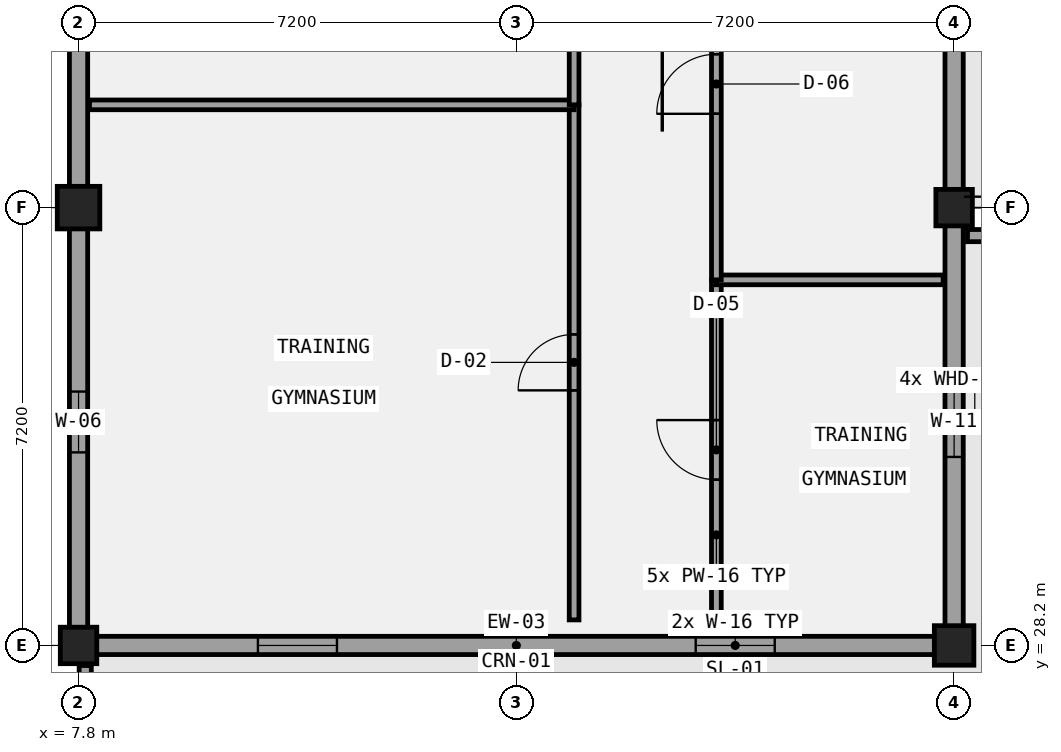
"""IFC4 building model, lengths in metres.
Left out: names, types, materials, properties, quantities, classifications, styles, units other than length and angle.
Written with IfcOpenShell. Run it as: python <this file> out.ifc"""

import sys

from ifc_helpers import new_model, si_unit, direction, frame, frame_2d, origin, origin_2d, place, context, subcontext, project, spatial, rectangle, extrude, element, fill, save


model = new_model("IFC4")
c1 = context("Model", 3, precision=1e-05, world=origin(), true_north=direction((0.0, 1.0)))
c2 = subcontext(c1, "Body", "Model", "MODEL_VIEW")
j1 = project(units=[si_unit("LENGTHUNIT", "METRE"), si_unit("PLANEANGLEUNIT", "RADIAN")], contexts=[c1])
p1 = place(None, origin())
s1 = spatial("IfcSite", under=j1, at=p1, CompositionType="ELEMENT")
p2 = place(p1, origin())
s2 = spatial("IfcBuilding", under=s1, at=p2, CompositionType="ELEMENT")
p3 = place(p2, frame((0.0, 0.0, 13.8)))
s3 = spatial("IfcBuildingStorey", under=s2, at=p3, CompositionType="ELEMENT", Elevation=13.8)
p4 = place(p3, frame((7.8, 28.2, 0.0), z_axis=(0.0, 0.0, 1.0), x_axis=(1.0, 0.0, 0.0)))
e1 = element("IfcColumn", 1, at=p4, inside=s3, PredefinedType="COLUMN", context=c2, shape_type="SweptSolid", body=[
    extrude(rectangle(XDim=0.6, YDim=0.6, at=origin_2d()), origin(), (0.0, 0.0, 1.0), 4.2),
])
p5 = place(p3, frame((7.8, 35.4, 0.0), z_axis=(0.0, 0.0, 1.0), x_axis=(1.0, 0.0, 0.0)))
e2 = element("IfcColumn", 2, at=p5, inside=s3, PredefinedType="COLUMN", context=c2, shape_type="SweptSolid", body=[
    extrude(rectangle(XDim=0.7, YDim=0.7, at=origin_2d()), origin(), (0.0, 0.0, 1.0), 4.2),
])
p6 = place(p3, frame((22.2, 28.2, 0.0), z_axis=(0.0, 0.0, 1.0), x_axis=(1.0, 0.0, 0.0)))
e3 = element("IfcColumn", 3, at=p6, inside=s3, PredefinedType="COLUMN", context=c2, shape_type="SweptSolid", body=[
    extrude(rectangle(XDim=0.65, YDim=0.65, at=origin_2d()), origin(), (0.0, 0.0, 1.0), 4.2),
])
p7 = place(p3, frame((22.2, 35.4, 0.0), z_axis=(0.0, 0.0, 1.0), x_axis=(1.0, 0.0, 0.0)))
e4 = element("IfcColumn", 4, at=p7, inside=s3, PredefinedType="COLUMN", context=c2, shape_type="SweptSolid", body=[
    extrude(rectangle(XDim=0.6, YDim=0.6, at=origin_2d()), origin(), (0.0, 0.0, 1.0), 4.2),
])
p8 = place(p3, frame((7.65, 28.2, 0.0), z_axis=(0.0, 0.0, 1.0), x_axis=(1.0, 0.0, 0.0)))
e5 = element("IfcWall", 5, at=p8, inside=s3, PredefinedType="SOLIDWALL", context=c2, shape_type="SweptSolid", body=[
    extrude(rectangle(XDim=14.7, YDim=0.3, at=frame_2d((7.35, 0.0))), origin(), (0.0, 0.0, 1.0), 2.74),
])
p9 = place(p8, frame((3.1, 0.0, 1.0)))
e6 = element("IfcOpeningElement", 6, at=p9, cuts=e5, PredefinedType="OPENING", context=c2, shape_type="SweptSolid", body=[
    extrude(rectangle(XDim=1.3, YDim=1.4, at=frame_2d((0.65, 0.7))), frame((0.0, 0.16, 0.0), z_axis=(0.0, -1.0, 0.0), x_axis=(1.0, 0.0, 0.0)), (0.0, 0.0, 1.0), 0.32),
])
p10 = place(p8, frame((10.3, 0.0, 1.0)))
e7 = element("IfcOpeningElement", 7, at=p10, cuts=e5, PredefinedType="OPENING", context=c2, shape_type="SweptSolid", body=[
    extrude(rectangle(XDim=1.3, YDim=1.4, at=frame_2d((0.65, 0.7))), frame((0.0, 0.16, 0.0), z_axis=(0.0, -1.0, 0.0), x_axis=(1.0, 0.0, 0.0)), (0.0, 0.0, 1.0), 0.32),
])
p11 = place(p3, frame((22.2, 28.35, 0.0), z_axis=(0.0, 0.0, 1.0), x_axis=(0.0, 1.0, 0.0)))
e8 = element("IfcWall", 8, at=p11, inside=s3, PredefinedType="SOLIDWALL", context=c2, shape_type="SweptSolid", body=[
    extrude(rectangle(XDim=28.5, YDim=0.3, at=frame_2d((14.25, 0.0))), origin(), (0.0, 0.0, 1.0), 2.94),
])
p12 = place(p11, frame((17.1, 0.0, 0.0)))
e9 = element("IfcOpeningElement", 9, at=p12, cuts=e8, PredefinedType="OPENING", context=c2, shape_type="SweptSolid", body=[
    extrude(rectangle(XDim=1.1, YDim=2.2, at=frame_2d((0.55, 1.1))), frame((0.0, 0.16, 0.0), z_axis=(0.0, -1.0, 0.0), x_axis=(1.0, 0.0, 0.0)), (0.0, 0.0, 1.0), 0.32),
])
p13 = place(p11, frame((2.95, 0.0, 1.0)))
e10 = element("IfcOpeningElement", 10, at=p13, cuts=e8, PredefinedType="OPENING", context=c2, shape_type="SweptSolid", body=[
    extrude(rectangle(XDim=1.15, YDim=1.4, at=frame_2d((0.575, 0.7))), frame((0.0, 0.16, 0.0), z_axis=(0.0, -1.0, 0.0), x_axis=(1.0, 0.0, 0.0)), (0.0, 0.0, 1.0), 0.32),
])
p14 = place(p11, frame((10.075, 0.0, 1.0)))
e11 = element("IfcOpeningElement", 11, at=p14, cuts=e8, PredefinedType="OPENING", context=c2, shape_type="SweptSolid", body=[
    extrude(rectangle(XDim=1.15, YDim=1.4, at=frame_2d((0.575, 0.7))), frame((0.0, 0.16, 0.0), z_axis=(0.0, -1.0, 0.0), x_axis=(1.0, 0.0, 0.0)), (0.0, 0.0, 1.0), 0.32),
])
p15 = place(p11, frame((24.4, 0.0, 1.0)))
e12 = element("IfcOpeningElement", 12, at=p15, cuts=e8, PredefinedType="OPENING", context=c2, shape_type="SweptSolid", body=[
    extrude(rectangle(XDim=1.15, YDim=1.4, at=frame_2d((0.575, 0.7))), frame((0.0, 0.16, 0.0), z_axis=(0.0, -1.0, 0.0), x_axis=(1.0, 0.0, 0.0)), (0.0, 0.0, 1.0), 0.32),
])
p16 = place(p3, frame((7.8, 56.85, 0.0), z_axis=(0.0, 0.0, 1.0), x_axis=(0.0, -1.0, 0.0)))
e13 = element("IfcWall", 13, at=p16, inside=s3, PredefinedType="SOLIDWALL", context=c2, shape_type="SweptSolid", body=[
    extrude(rectangle(XDim=28.5, YDim=0.3, at=frame_2d((14.25, 0.0))), origin(), (0.0, 0.0, 1.0), 3.04),
])
p17 = place(p16, frame((24.475, 0.0, 1.0)))
e14 = element("IfcOpeningElement", 14, at=p17, cuts=e13, PredefinedType="OPENING", context=c2, shape_type="SweptSolid", body=[
    extrude(rectangle(XDim=1.0, YDim=1.4, at=frame_2d((0.5, 0.7))), frame((0.0, 0.16, 0.0), z_axis=(0.0, -1.0, 0.0), x_axis=(1.0, 0.0, 0.0)), (0.0, 0.0, 1.0), 0.32),
])
p18 = place(p16, frame((17.35, 0.0, 1.0)))
e15 = element("IfcOpeningElement", 15, at=p18, cuts=e13, PredefinedType="OPENING", context=c2, shape_type="SweptSolid", body=[
    extrude(rectangle(XDim=1.0, YDim=1.4, at=frame_2d((0.5, 0.7))), frame((0.0, 0.16, 0.0), z_axis=(0.0, -1.0, 0.0), x_axis=(1.0, 0.0, 0.0)), (0.0, 0.0, 1.0), 0.32),
])
p19 = place(p16, frame((10.15, 0.0, 1.0)))
e16 = element("IfcOpeningElement", 16, at=p19, cuts=e13, PredefinedType="OPENING", context=c2, shape_type="SweptSolid", body=[
    extrude(rectangle(XDim=1.0, YDim=1.4, at=frame_2d((0.5, 0.7))), frame((0.0, 0.16, 0.0), z_axis=(0.0, -1.0, 0.0), x_axis=(1.0, 0.0, 0.0)), (0.0, 0.0, 1.0), 0.32),
])
p20 = place(p16, frame((3.025, 0.0, 1.0)))
e17 = element("IfcOpeningElement", 17, at=p20, cuts=e13, PredefinedType="OPENING", context=c2, shape_type="SweptSolid", body=[
    extrude(rectangle(XDim=1.0, YDim=1.4, at=frame_2d((0.5, 0.7))), frame((0.0, 0.16, 0.0), z_axis=(0.0, -1.0, 0.0), x_axis=(1.0, 0.0, 0.0)), (0.0, 0.0, 1.0), 0.32),
])
p21 = place(p3, frame((22.42, 34.94, 0.0), z_axis=(0.0, 0.0, 1.0), x_axis=(1.0, 0.0, 0.0)))
e18 = element("IfcWall", 18, at=p21, inside=s3, PredefinedType="PARAPET", context=c2, shape_type="SweptSolid", body=[
    extrude(rectangle(XDim=2.58, YDim=0.2, at=frame_2d((1.29, 0.0))), origin(), (0.0, 0.0, 1.0), 1.12),
])
p22 = place(p3, frame((7.91, 21.22, 0.0), z_axis=(0.0, 0.0, 1.0), x_axis=(0.0, 1.0, 0.0)))
e19 = element("IfcWall", 19, at=p22, inside=s3, PredefinedType="PARAPET", context=c2, shape_type="SweptSolid", body=[
    extrude(rectangle(XDim=6.65, YDim=0.2, at=frame_2d((3.325, 0.0))), origin(), (0.0, 0.0, 1.0), 1.12),
])
p23 = place(p3, frame((15.95, 28.62, 0.0), z_axis=(0.0, 0.0, 1.0), x_axis=(0.0, 1.0, 0.0)))
e20 = element("IfcWall", 20, at=p23, inside=s3, PredefinedType="PARTITIONING", context=c2, shape_type="SweptSolid", body=[
    extrude(rectangle(XDim=8.47, YDim=0.16, at=frame_2d((4.235, 0.0))), origin(), (0.0, 0.0, 1.0), 3.94),
])
p24 = place(p23, frame((3.775, 0.0, 0.0)))
e21 = element("IfcOpeningElement", 21, at=p24, cuts=e20, PredefinedType="OPENING", context=c2, shape_type="SweptSolid", body=[
    extrude(rectangle(XDim=0.92, YDim=2.22, at=frame_2d((0.46, 1.11))), frame((0.0, 0.09, 0.0), z_axis=(0.0, -1.0, 0.0), x_axis=(1.0, 0.0, 0.0)), (0.0, 0.0, 1.0), 0.18),
])
p25 = place(p3, frame((7.98, 37.09, 0.0), z_axis=(0.0, 0.0, 1.0), x_axis=(1.0, 0.0, 0.0)))
e22 = element("IfcWall", 22, at=p25, inside=s3, PredefinedType="PARTITIONING", context=c2, shape_type="SweptSolid", body=[
    extrude(rectangle(XDim=7.97, YDim=0.16, at=frame_2d((3.985, 0.0))), origin(), (0.0, 0.0, 1.0), 3.94),
])
p26 = place(p3, frame((15.95, 37.09, 0.0), z_axis=(0.0, 0.0, 1.0), x_axis=(0.0, 1.0, 0.0)))
e23 = element("IfcWall", 23, at=p26, inside=s3, PredefinedType="PARTITIONING", context=c2, shape_type="SweptSolid", body=[
    extrude(rectangle(XDim=11.02, YDim=0.16, at=frame_2d((5.51, 0.0))), origin(), (0.0, 0.0, 1.0), 3.94),
])
p27 = place(p26, frame((5.05, 0.0, 0.0)))
e24 = element("IfcOpeningElement", 24, at=p27, cuts=e23, PredefinedType="OPENING", context=c2, shape_type="SweptSolid", body=[
    extrude(rectangle(XDim=0.92, YDim=2.35, at=frame_2d((0.46, 1.175))), frame((0.0, 0.09, 0.0), z_axis=(0.0, -1.0, 0.0), x_axis=(1.0, 0.0, 0.0)), (0.0, 0.0, 1.0), 0.18),
])
p28 = place(p3, frame((18.29, 28.62, 0.0), z_axis=(0.0, 0.0, 1.0), x_axis=(0.0, 1.0, 0.0)))
e25 = element("IfcWall", 25, at=p28, inside=s3, PredefinedType="PARTITIONING", context=c2, shape_type="SweptSolid", body=[
    extrude(rectangle(XDim=5.592, YDim=0.16, at=frame_2d((2.796, 0.0))), origin(), (0.0, 0.0, 1.0), 3.94),
])
p29 = place(p28, frame((2.306, 0.0, 0.0)))
e26 = element("IfcOpeningElement", 26, at=p29, cuts=e25, PredefinedType="OPENING", context=c2, shape_type="SweptSolid", body=[
    extrude(rectangle(XDim=0.98, YDim=2.22, at=frame_2d((0.49, 1.11))), frame((0.0, 0.09, 0.0), z_axis=(0.0, -1.0, 0.0), x_axis=(1.0, 0.0, 0.0)), (0.0, 0.0, 1.0), 0.18),
])
p30 = place(p3, frame((18.29, 34.212, 0.0), z_axis=(0.0, 0.0, 1.0), x_axis=(1.0, 0.0, 0.0)))
e27 = element("IfcWall", 27, at=p30, inside=s3, PredefinedType="PARTITIONING", context=c2, shape_type="SweptSolid", body=[
    extrude(rectangle(XDim=3.73, YDim=0.16, at=frame_2d((1.865, 0.0))), origin(), (0.0, 0.0, 1.0), 3.94),
])
p31 = place(p3, frame((18.29, 34.212, 0.0), z_axis=(0.0, 0.0, 1.0), x_axis=(0.0, 1.0, 0.0)))
e28 = element("IfcWall", 28, at=p31, inside=s3, PredefinedType="PARTITIONING", context=c2, shape_type="SweptSolid", body=[
    extrude(rectangle(XDim=6.442, YDim=0.16, at=frame_2d((3.221, 0.0))), origin(), (0.0, 0.0, 1.0), 3.94),
])
p32 = place(p31, frame((2.731, 0.0, 0.0)))
e29 = element("IfcOpeningElement", 29, at=p32, cuts=e28, PredefinedType="OPENING", context=c2, shape_type="SweptSolid", body=[
    extrude(rectangle(XDim=0.98, YDim=2.35, at=frame_2d((0.49, 1.175))), frame((0.0, 0.09, 0.0), z_axis=(0.0, -1.0, 0.0), x_axis=(1.0, 0.0, 0.0)), (0.0, 0.0, 1.0), 0.18),
])
p33 = place(p9, origin())
e30 = element("IfcWindow", 30, at=p33, inside=s3, PartitioningType="SINGLE_PANEL", PredefinedType="WINDOW", context=c2, shape_type="SweptSolid", body=[
    extrude(rectangle(XDim=1.3, YDim=1.4, at=frame_2d((0.65, 0.7))), frame((0.0, 0.03, 0.0), z_axis=(0.0, -1.0, 0.0), x_axis=(1.0, 0.0, 0.0)), (0.0, 0.0, 1.0), 0.06),
])
fill(e6, e30)
p34 = place(p10, origin())
e31 = element("IfcWindow", 31, at=p34, inside=s3, PartitioningType="SINGLE_PANEL", PredefinedType="WINDOW", context=c2, shape_type="SweptSolid", body=[
    extrude(rectangle(XDim=1.3, YDim=1.4, at=frame_2d((0.65, 0.7))), frame((0.0, 0.03, 0.0), z_axis=(0.0, -1.0, 0.0), x_axis=(1.0, 0.0, 0.0)), (0.0, 0.0, 1.0), 0.06),
])
fill(e7, e31)
p35 = place(p13, origin())
e32 = element("IfcWindow", 32, at=p35, inside=s3, PartitioningType="SINGLE_PANEL", PredefinedType="WINDOW", context=c2, shape_type="SweptSolid", body=[
    extrude(rectangle(XDim=1.15, YDim=1.4, at=frame_2d((0.575, 0.7))), frame((0.0, 0.03, 0.0), z_axis=(0.0, -1.0, 0.0), x_axis=(1.0, 0.0, 0.0)), (0.0, 0.0, 1.0), 0.06),
])
fill(e10, e32)
p36 = place(p17, origin())
e33 = element("IfcWindow", 33, at=p36, inside=s3, PartitioningType="SINGLE_PANEL", PredefinedType="WINDOW", context=c2, shape_type="SweptSolid", body=[
    extrude(rectangle(XDim=1.0, YDim=1.4, at=frame_2d((0.5, 0.7))), frame((0.0, 0.03, 0.0), z_axis=(0.0, -1.0, 0.0), x_axis=(1.0, 0.0, 0.0)), (0.0, 0.0, 1.0), 0.06),
])
fill(e14, e33)
p37 = place(p24, frame((0.92, 0.0, 0.0), z_axis=(0.0, 0.0, 1.0), x_axis=(-1.0, 0.0, 0.0)))
e34 = element("IfcDoor", 34, at=p37, inside=s3, OperationType="SINGLE_SWING_LEFT", PredefinedType="DOOR", context=c2, shape_type="SweptSolid", body=[
    extrude(rectangle(XDim=0.92, YDim=2.22, at=frame_2d((0.46, 1.11))), frame((0.0, 0.025, 0.0), z_axis=(0.0, -1.0, 0.0), x_axis=(1.0, 0.0, 0.0)), (0.0, 0.0, 1.0), 0.05),
])
fill(e21, e34)
p38 = place(p29, origin())
e35 = element("IfcDoor", 35, at=p38, inside=s3, OperationType="SINGLE_SWING_RIGHT", PredefinedType="DOOR", context=c2, shape_type="SweptSolid", body=[
    extrude(rectangle(XDim=0.98, YDim=2.22, at=frame_2d((0.49, 1.11))), frame((0.0, 0.025, 0.0), z_axis=(0.0, -1.0, 0.0), x_axis=(1.0, 0.0, 0.0)), (0.0, 0.0, 1.0), 0.05),
])
fill(e26, e35)
p39 = place(p32, origin())
e36 = element("IfcDoor", 36, at=p39, inside=s3, OperationType="SINGLE_SWING_LEFT", PredefinedType="DOOR", context=c2, shape_type="SweptSolid", body=[
    extrude(rectangle(XDim=0.98, YDim=2.35, at=frame_2d((0.49, 1.175))), frame((0.0, 0.025, 0.0), z_axis=(0.0, -1.0, 0.0), x_axis=(1.0, 0.0, 0.0)), (0.0, 0.0, 1.0), 0.05),
])
fill(e29, e36)
save(model, sys.argv[1])
